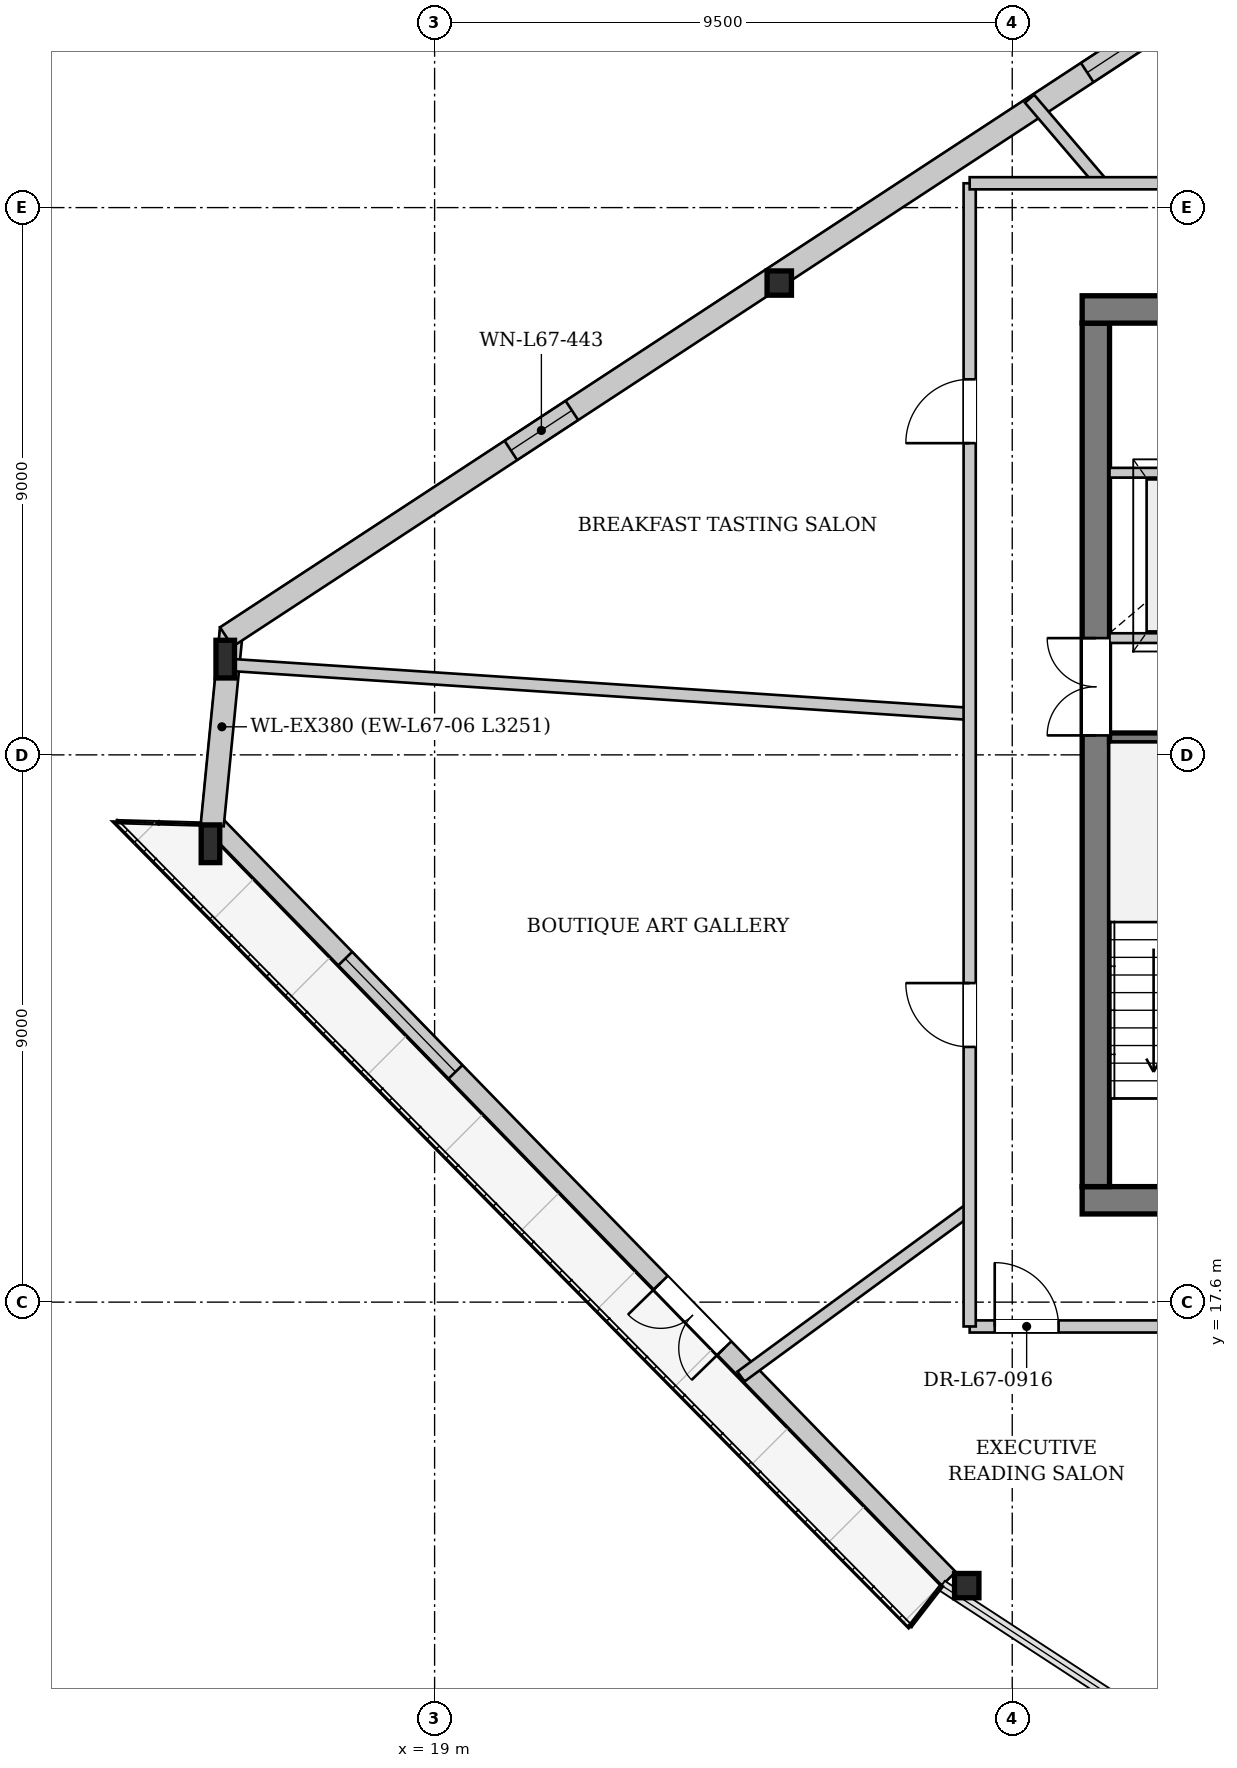
"""IFC4 building model, lengths in metres.
Left out: names, types, materials, properties, quantities, classifications, styles, units other than length and angle.
Written with IfcOpenShell. Run it as: python <this file> out.ifc"""

import sys

from ifc_helpers import new_model, si_unit, direction, frame, frame_2d, origin, origin_2d, place, context, subcontext, project, spatial, rectangle, i_section, extrude, source, transform, mapped, element, fill, save


model = new_model("IFC4")
c1 = context("Model", 3, precision=1e-05, world=origin(), true_north=direction((0.0, 1.0)))
c2 = subcontext(c1, "Body", "Model", "MODEL_VIEW")
j1 = project(units=[si_unit("LENGTHUNIT", "METRE"), si_unit("PLANEANGLEUNIT", "RADIAN")], contexts=[c1])
p1 = place(None, origin())
s1 = spatial("IfcSite", under=j1, at=p1, CompositionType="ELEMENT")
p2 = place(p1, origin())
s2 = spatial("IfcBuilding", under=s1, at=p2, CompositionType="ELEMENT")
p3 = place(p2, frame((0.0, 0.0, 252.5)))
s3 = spatial("IfcBuildingStorey", under=s2, at=p3, CompositionType="ELEMENT", Elevation=252.5)
m1 = source(origin(), c2, "Body", "SweptSolid", [
    extrude(i_section(OverallWidth=0.401, OverallDepth=0.399, WebThickness=0.022, FlangeThickness=0.034, at=origin_2d()), origin(), (0.0, 0.0, 1.0), 3.53),
])
p4 = place(p3, frame((24.722, 34.763, 0.0), z_axis=(-0.030704903352, -0.228696205821, 0.973013491352), x_axis=(0.991107085952, -0.133066690705, 0.0)))
e1 = element("IfcColumn", 1, at=p4, inside=s3, PredefinedType="COLUMN", context=c2, shape_type="MappedRepresentation", body=[
    mapped(m1, transform((0.0, 0.0, 0.0), x_axis=(1.0, 0.0, 0.0), y_axis=(0.0, 1.0, 0.0), z_axis=(0.0, 0.0, 1.0), scale=1.0)),
])
m2 = source(origin(), c2, "Body", "SweptSolid", [
    extrude(i_section(OverallWidth=0.305, OverallDepth=0.62, WebThickness=0.021, FlangeThickness=0.04, at=origin_2d()), origin(), (0.0, 0.0, 1.0), 3.595),
])
p5 = place(p3, frame((15.471, 28.698, 0.0), z_axis=(0.047604177854, -0.291193601478, 0.95547900485), x_axis=(0.986899246585, 0.161337773287, 0.0)))
e2 = element("IfcColumn", 2, at=p5, inside=s3, PredefinedType="COLUMN", context=c2, shape_type="MappedRepresentation", body=[
    mapped(m2, transform((0.0, 0.0, 0.0), x_axis=(1.0, 0.0, 0.0), y_axis=(0.0, 1.0, 0.0), z_axis=(0.0, 0.0, 1.0), scale=1.0)),
])
m3 = source(origin(), c2, "Body", "SweptSolid", [
    extrude(i_section(OverallWidth=0.305, OverallDepth=0.62, WebThickness=0.021, FlangeThickness=0.04, at=origin_2d()), origin(), (0.0, 0.0, 1.0), 3.51),
])
p6 = place(p3, frame((15.154, 25.462, 0.0), z_axis=(0.091177357458, -0.184788893033, 0.978539602928), x_axis=(0.896777314294, 0.442482144915, 0.0)))
e3 = element("IfcColumn", 3, at=p6, inside=s3, PredefinedType="COLUMN", context=c2, shape_type="MappedRepresentation", body=[
    mapped(m3, transform((0.0, 0.0, 0.0), x_axis=(1.0, 0.0, 0.0), y_axis=(0.0, 1.0, 0.0), z_axis=(0.0, 0.0, 1.0), scale=1.0)),
])
m4 = source(origin(), c2, "Body", "SweptSolid", [
    extrude(i_section(OverallWidth=0.401, OverallDepth=0.399, WebThickness=0.022, FlangeThickness=0.034, at=origin_2d()), origin(), (0.0, 0.0, 1.0), 3.532),
])
p7 = place(p3, frame((27.341, 12.94, 0.0), z_axis=(0.232405350285, -0.001036906679, 0.972618464756), x_axis=(0.004461585576, 0.999990047078, 0.0)))
e4 = element("IfcColumn", 4, at=p7, inside=s3, PredefinedType="COLUMN", context=c2, shape_type="MappedRepresentation", body=[
    mapped(m4, transform((0.0, 0.0, 0.0), x_axis=(1.0, 0.0, 0.0), y_axis=(0.0, 1.0, 0.0), z_axis=(0.0, 0.0, 1.0), scale=1.0)),
])
p8 = place(p3, frame((27.456, 13.052, 0.0), z_axis=(0.0, 0.0, 1.0), x_axis=(-0.697464355139, 0.71661947595, 0.0)))
e5 = element("IfcWall", 5, at=p8, inside=s3, PredefinedType="SOLIDWALL", context=c2, shape_type="SweptSolid", body=[
    extrude(rectangle(XDim=17.474, YDim=0.32, at=frame_2d((8.737, 0.0))), origin(), (0.0, 0.0, 1.0), 2.872),
])
p9 = place(p8, frame((5.292, 0.0, 0.0)))
e6 = element("IfcOpeningElement", 6, at=p9, cuts=e5, PredefinedType="OPENING", context=c2, shape_type="SweptSolid", body=[
    extrude(rectangle(XDim=1.5, YDim=2.3, at=frame_2d((0.75, 1.15))), frame((0.0, 0.17, 0.0), z_axis=(0.0, -1.0, 0.0), x_axis=(1.0, 0.0, 0.0)), (0.0, 0.0, 1.0), 0.34),
])
p10 = place(p8, frame((11.631, 0.0, 0.402)))
e7 = element("IfcOpeningElement", 7, at=p10, cuts=e5, PredefinedType="OPENING", context=c2, shape_type="SweptSolid", body=[
    extrude(rectangle(XDim=2.6, YDim=2.35, at=frame_2d((1.3, 1.175))), frame((0.0, 0.17, 0.0), z_axis=(0.0, -1.0, 0.0), x_axis=(1.0, 0.0, 0.0)), (0.0, 0.0, 1.0), 0.34),
])
p11 = place(p3, frame((15.343, 25.444, 0.0), z_axis=(0.0, 0.0, 1.0), x_axis=(0.097555380109, 0.995230097923, 0.0)))
e8 = element("IfcWall", 8, at=p11, inside=s3, PredefinedType="SOLIDWALL", context=c2, shape_type="SweptSolid", body=[
    extrude(rectangle(XDim=3.251, YDim=0.38, at=frame_2d((1.625, 0.0))), origin(), (0.0, 0.0, 1.0), 2.872),
])
p12 = place(p3, frame((15.575, 28.539, 0.0), z_axis=(0.0, 0.0, 1.0), x_axis=(0.836303758155, 0.5482663806, 0.0)))
e9 = element("IfcWall", 9, at=p12, inside=s3, PredefinedType="SOLIDWALL", context=c2, shape_type="SweptSolid", body=[
    extrude(rectangle(XDim=22.124, YDim=0.38, at=frame_2d((11.062, 0.0))), origin(), (0.0, 0.0, 1.0), 2.872),
])
p13 = place(p12, frame((5.595, 0.0, 0.65)))
e10 = element("IfcOpeningElement", 10, at=p13, cuts=e9, PredefinedType="OPENING", context=c2, shape_type="SweptSolid", body=[
    extrude(rectangle(XDim=1.2, YDim=1.5, at=frame_2d((0.6, 0.75))), frame((0.0, 0.2, 0.0), z_axis=(0.0, -1.0, 0.0), x_axis=(1.0, 0.0, 0.0)), (0.0, 0.0, 1.0), 0.4),
])
p14 = place(p12, frame((16.929, 0.0, 0.65)))
e11 = element("IfcOpeningElement", 11, at=p14, cuts=e9, PredefinedType="OPENING", context=c2, shape_type="SweptSolid", body=[
    extrude(rectangle(XDim=1.2, YDim=1.5, at=frame_2d((0.6, 0.75))), frame((0.0, 0.2, 0.0), z_axis=(0.0, -1.0, 0.0), x_axis=(1.0, 0.0, 0.0)), (0.0, 0.0, 1.0), 0.4),
])
p15 = place(p3, frame((46.35, 19.275, 0.0), z_axis=(0.0, 0.0, 1.0), x_axis=(-1.0, 0.0, 0.0)))
e12 = element("IfcWall", 12, at=p15, inside=s3, PredefinedType="SHEAR", context=c2, shape_type="SweptSolid", body=[
    extrude(rectangle(XDim=16.7, YDim=0.45, at=frame_2d((8.35, 0.0))), origin(), (0.0, 0.0, 1.0), 3.38),
])
p16 = place(p15, frame((4.55, 0.0, 0.0)))
e13 = element("IfcOpeningElement", 13, at=p16, cuts=e12, PredefinedType="OPENING", context=c2, shape_type="SweptSolid", body=[
    extrude(rectangle(XDim=1.12, YDim=2.25, at=frame_2d((0.56, 1.125))), frame((0.0, 0.235, 0.0), z_axis=(0.0, -1.0, 0.0), x_axis=(1.0, 0.0, 0.0)), (0.0, 0.0, 1.0), 0.47),
])
p17 = place(p15, frame((11.05, 0.0, 0.0)))
e14 = element("IfcOpeningElement", 14, at=p17, cuts=e12, PredefinedType="OPENING", context=c2, shape_type="SweptSolid", body=[
    extrude(rectangle(XDim=1.12, YDim=2.25, at=frame_2d((0.56, 1.125))), frame((0.0, 0.235, 0.0), z_axis=(0.0, -1.0, 0.0), x_axis=(1.0, 0.0, 0.0)), (0.0, 0.0, 1.0), 0.47),
])
p18 = place(p3, frame((29.875, 19.5, 0.0), z_axis=(0.0, 0.0, 1.0), x_axis=(0.0, 1.0, 0.0)))
e15 = element("IfcWall", 15, at=p18, inside=s3, PredefinedType="SHEAR", context=c2, shape_type="SweptSolid", body=[
    extrude(rectangle(XDim=14.2, YDim=0.45, at=frame_2d((7.1, 0.0))), origin(), (0.0, 0.0, 1.0), 3.38),
])
p19 = place(p18, frame((7.42, 0.0, 0.0)))
e16 = element("IfcOpeningElement", 16, at=p19, cuts=e15, PredefinedType="OPENING", context=c2, shape_type="SweptSolid", body=[
    extrude(rectangle(XDim=1.6, YDim=2.2, at=frame_2d((0.8, 1.1))), frame((0.0, 0.235, 0.0), z_axis=(0.0, -1.0, 0.0), x_axis=(1.0, 0.0, 0.0)), (0.0, 0.0, 1.0), 0.47),
])
p20 = place(p3, frame((29.65, 33.925, 0.0), z_axis=(0.0, 0.0, 1.0), x_axis=(1.0, 0.0, 0.0)))
e17 = element("IfcWall", 17, at=p20, inside=s3, PredefinedType="SHEAR", context=c2, shape_type="SweptSolid", body=[
    extrude(rectangle(XDim=16.7, YDim=0.45, at=frame_2d((8.35, 0.0))), origin(), (0.0, 0.0, 1.0), 3.38),
])
p21 = place(p20, frame((1.45, 0.0, 0.0)))
e18 = element("IfcOpeningElement", 18, at=p21, cuts=e17, PredefinedType="OPENING", context=c2, shape_type="SweptSolid", body=[
    extrude(rectangle(XDim=0.95, YDim=2.1, at=frame_2d((0.475, 1.05))), frame((0.0, 0.235, 0.0), z_axis=(0.0, -1.0, 0.0), x_axis=(1.0, 0.0, 0.0)), (0.0, 0.0, 1.0), 0.47),
])
p22 = place(p20, frame((3.83, 0.0, 0.0)))
e19 = element("IfcOpeningElement", 19, at=p22, cuts=e17, PredefinedType="OPENING", context=c2, shape_type="SweptSolid", body=[
    extrude(rectangle(XDim=1.32, YDim=2.2, at=frame_2d((0.66, 1.1))), frame((0.0, 0.235, 0.0), z_axis=(0.0, -1.0, 0.0), x_axis=(1.0, 0.0, 0.0)), (0.0, 0.0, 1.0), 0.47),
])
for number, where, z_axis, x_axis in (
    (20, (30.1, 26.88, 0.0), (0.0, 0.0, 1.0), (1.0, 0.0, 0.0)),
    (21, (30.1, 28.52, 0.0), (0.0, 0.0, 1.0), (1.0, 0.0, 0.0)),
):
    element("IfcWall", number, at=place(p3, frame(where, z_axis=z_axis, x_axis=x_axis)), inside=s3, PredefinedType="PARTITIONING", context=c2, shape_type="SweptSolid", body=[
        extrude(rectangle(XDim=3.02, YDim=0.16, at=frame_2d((1.51, 0.0))), origin(), (0.0, 0.0, 1.0), 3.38),
    ])
p23 = place(p3, frame((30.1, 31.24, 0.0), z_axis=(0.0, 0.0, 1.0), x_axis=(1.0, 0.0, 0.0)))
e22 = element("IfcWall", 22, at=p23, inside=s3, PredefinedType="PARTITIONING", context=c2, shape_type="SweptSolid", body=[
    extrude(rectangle(XDim=3.02, YDim=0.16, at=frame_2d((1.51, 0.0))), origin(), (0.0, 0.0, 1.0), 3.38),
])
p24 = place(p23, frame((0.91, 0.0, 0.0)))
e23 = element("IfcOpeningElement", 23, at=p24, cuts=e22, PredefinedType="OPENING", context=c2, shape_type="SweptSolid", body=[
    extrude(rectangle(XDim=1.2, YDim=2.2, at=frame_2d((0.6, 1.1))), frame((0.0, 0.09, 0.0), z_axis=(0.0, -1.0, 0.0), x_axis=(1.0, 0.0, 0.0)), (0.0, 0.0, 1.0), 0.18),
])
p25 = place(p3, frame((29.972, 36.0, 0.0), z_axis=(0.0, 0.0, 1.0), x_axis=(-0.649426318999, 0.760424523665, 0.0)))
e24 = element("IfcWall", 24, at=p25, inside=s3, PredefinedType="PARTITIONING", context=c2, shape_type="SweptSolid", body=[
    extrude(rectangle(XDim=1.828, YDim=0.2, at=frame_2d((0.914, 0.0))), origin(), (0.0, 0.0, 1.0), 3.38),
])
p26 = place(p3, frame((27.8, 27.275, 0.0), z_axis=(0.0, 0.0, 1.0), x_axis=(-0.997817226198, 0.066036225681, 0.0)))
e25 = element("IfcWall", 25, at=p26, inside=s3, PredefinedType="PARTITIONING", context=c2, shape_type="SweptSolid", body=[
    extrude(rectangle(XDim=12.385, YDim=0.2, at=frame_2d((6.193, 0.0))), origin(), (0.0, 0.0, 1.0), 3.055),
])
p27 = place(p3, frame((27.8, 19.131, 0.0), z_axis=(0.0, 0.0, 1.0), x_axis=(-0.80679773716, -0.590827734042, 0.0)))
e26 = element("IfcWall", 26, at=p27, inside=s3, PredefinedType="PARTITIONING", context=c2, shape_type="SweptSolid", body=[
    extrude(rectangle(XDim=4.662, YDim=0.2, at=frame_2d((2.331, 0.0))), origin(), (0.0, 0.0, 1.0), 3.38),
])
p28 = place(p3, frame((27.8, 17.2, 0.0), z_axis=(0.0, 0.0, 1.0), x_axis=(1.0, 0.0, 0.0)))
e27 = element("IfcWall", 27, at=p28, inside=s3, PredefinedType="PARTITIONING", context=c2, shape_type="SweptSolid", body=[
    extrude(rectangle(XDim=20.4, YDim=0.2, at=frame_2d((10.2, 0.0))), origin(), (0.0, 0.0, 1.0), 3.38),
])
p29 = place(p28, frame((9.356, 0.0, 0.0)))
e28 = element("IfcOpeningElement", 28, at=p29, cuts=e27, PredefinedType="OPENING", context=c2, shape_type="SweptSolid", body=[
    extrude(rectangle(XDim=1.05, YDim=2.2, at=frame_2d((0.525, 1.1))), frame((0.0, 0.11, 0.0), z_axis=(0.0, -1.0, 0.0), x_axis=(1.0, 0.0, 0.0)), (0.0, 0.0, 1.0), 0.22),
])
p30 = place(p28, frame((17.51, 0.0, 0.0)))
e29 = element("IfcOpeningElement", 29, at=p30, cuts=e27, PredefinedType="OPENING", context=c2, shape_type="SweptSolid", body=[
    extrude(rectangle(XDim=1.05, YDim=2.2, at=frame_2d((0.525, 1.1))), frame((0.0, 0.11, 0.0), z_axis=(0.0, -1.0, 0.0), x_axis=(1.0, 0.0, 0.0)), (0.0, 0.0, 1.0), 0.22),
])
p31 = place(p28, frame((0.412, 0.0, 0.0)))
e30 = element("IfcOpeningElement", 30, at=p31, cuts=e27, PredefinedType="OPENING", context=c2, shape_type="SweptSolid", body=[
    extrude(rectangle(XDim=1.05, YDim=2.2, at=frame_2d((0.525, 1.1))), frame((0.0, 0.11, 0.0), z_axis=(0.0, -1.0, 0.0), x_axis=(1.0, 0.0, 0.0)), (0.0, 0.0, 1.0), 0.22),
])
p32 = place(p3, frame((27.8, 17.2, 0.0), z_axis=(0.0, 0.0, 1.0), x_axis=(0.0, 1.0, 0.0)))
e31 = element("IfcWall", 31, at=p32, inside=s3, PredefinedType="PARTITIONING", context=c2, shape_type="SweptSolid", body=[
    extrude(rectangle(XDim=18.8, YDim=0.2, at=frame_2d((9.4, 0.0))), origin(), (0.0, 0.0, 1.0), 3.38),
])
p33 = place(p32, frame((14.526, 0.0, 0.0)))
e32 = element("IfcOpeningElement", 32, at=p33, cuts=e31, PredefinedType="OPENING", context=c2, shape_type="SweptSolid", body=[
    extrude(rectangle(XDim=1.05, YDim=2.2, at=frame_2d((0.525, 1.1))), frame((0.0, 0.11, 0.0), z_axis=(0.0, -1.0, 0.0), x_axis=(1.0, 0.0, 0.0)), (0.0, 0.0, 1.0), 0.22),
])
p34 = place(p32, frame((4.597, 0.0, 0.0)))
e33 = element("IfcOpeningElement", 33, at=p34, cuts=e31, PredefinedType="OPENING", context=c2, shape_type="SweptSolid", body=[
    extrude(rectangle(XDim=1.05, YDim=2.2, at=frame_2d((0.525, 1.1))), frame((0.0, 0.11, 0.0), z_axis=(0.0, -1.0, 0.0), x_axis=(1.0, 0.0, 0.0)), (0.0, 0.0, 1.0), 0.22),
])
p35 = place(p3, frame((27.8, 36.0, 0.0), z_axis=(0.0, 0.0, 1.0), x_axis=(1.0, 0.0, 0.0)))
e34 = element("IfcWall", 34, at=p35, inside=s3, PredefinedType="PARTITIONING", context=c2, shape_type="SweptSolid", body=[
    extrude(rectangle(XDim=13.2, YDim=0.2, at=frame_2d((6.6, 0.0))), origin(), (0.0, 0.0, 1.0), 3.38),
])
p36 = place(p35, frame((11.129, 0.0, 0.0)))
e35 = element("IfcOpeningElement", 35, at=p36, cuts=e34, PredefinedType="OPENING", context=c2, shape_type="SweptSolid", body=[
    extrude(rectangle(XDim=1.05, YDim=2.2, at=frame_2d((0.525, 1.1))), frame((0.0, 0.11, 0.0), z_axis=(0.0, -1.0, 0.0), x_axis=(1.0, 0.0, 0.0)), (0.0, 0.0, 1.0), 0.22),
])
p37 = place(p35, frame((3.396, 0.0, 0.0)))
e36 = element("IfcOpeningElement", 36, at=p37, cuts=e34, PredefinedType="OPENING", context=c2, shape_type="SweptSolid", body=[
    extrude(rectangle(XDim=1.05, YDim=2.2, at=frame_2d((0.525, 1.1))), frame((0.0, 0.11, 0.0), z_axis=(0.0, -1.0, 0.0), x_axis=(1.0, 0.0, 0.0)), (0.0, 0.0, 1.0), 0.22),
])
m5 = source(origin(), c2, "Body", "SweptSolid", [
    extrude(rectangle(XDim=1.5, YDim=2.3, at=frame_2d((0.75, 1.15))), frame((0.0, 0.025, 0.0), z_axis=(0.0, -1.0, 0.0), x_axis=(1.0, 0.0, 0.0)), (0.0, 0.0, 1.0), 0.05),
])
p38 = place(p9, origin())
e37 = element("IfcDoor", 37, at=p38, inside=s3, OperationType="DOUBLE_DOOR_SINGLE_SWING", PredefinedType="DOOR", context=c2, shape_type="MappedRepresentation", body=[
    mapped(m5, transform((0.0, 0.0, 0.0), x_axis=(1.0, 0.0, 0.0), y_axis=(0.0, 1.0, 0.0), z_axis=(0.0, 0.0, 1.0), scale=1.0)),
])
fill(e6, e37)
m6 = source(origin(), c2, "Body", "SweptSolid", [
    extrude(rectangle(XDim=2.6, YDim=2.35, at=frame_2d((1.3, 1.175))), frame((0.0, 0.03, 0.0), z_axis=(0.0, -1.0, 0.0), x_axis=(1.0, 0.0, 0.0)), (0.0, 0.0, 1.0), 0.06),
])
p39 = place(p10, origin())
e38 = element("IfcWindow", 38, at=p39, inside=s3, PartitioningType="SINGLE_PANEL", PredefinedType="WINDOW", context=c2, shape_type="MappedRepresentation", body=[
    mapped(m6, transform((0.0, 0.0, 0.0), x_axis=(1.0, 0.0, 0.0), y_axis=(0.0, 1.0, 0.0), z_axis=(0.0, 0.0, 1.0), scale=1.0)),
])
fill(e7, e38)
m7 = source(origin(), c2, "Body", "SweptSolid", [
    extrude(rectangle(XDim=1.2, YDim=1.5, at=frame_2d((0.6, 0.75))), frame((0.0, 0.03, 0.0), z_axis=(0.0, -1.0, 0.0), x_axis=(1.0, 0.0, 0.0)), (0.0, 0.0, 1.0), 0.06),
])
p40 = place(p13, origin())
e39 = element("IfcWindow", 39, at=p40, inside=s3, PartitioningType="SINGLE_PANEL", PredefinedType="WINDOW", context=c2, shape_type="MappedRepresentation", body=[
    mapped(m7, transform((0.0, 0.0, 0.0), x_axis=(1.0, 0.0, 0.0), y_axis=(0.0, 1.0, 0.0), z_axis=(0.0, 0.0, 1.0), scale=1.0)),
])
fill(e10, e39)
p41 = place(p14, origin())
e40 = element("IfcWindow", 40, at=p41, inside=s3, PartitioningType="SINGLE_PANEL", PredefinedType="WINDOW", context=c2, shape_type="MappedRepresentation", body=[
    mapped(m7, transform((0.0, 0.0, 0.0), x_axis=(1.0, 0.0, 0.0), y_axis=(0.0, 1.0, 0.0), z_axis=(0.0, 0.0, 1.0), scale=1.0)),
])
fill(e11, e40)
m8 = source(origin(), c2, "Body", "SweptSolid", [
    extrude(rectangle(XDim=1.6, YDim=2.2, at=frame_2d((0.8, 1.1))), frame((0.0, 0.025, 0.0), z_axis=(0.0, -1.0, 0.0), x_axis=(1.0, 0.0, 0.0)), (0.0, 0.0, 1.0), 0.05),
])
p42 = place(p19, origin())
e41 = element("IfcDoor", 41, at=p42, inside=s3, OperationType="DOUBLE_DOOR_SINGLE_SWING", PredefinedType="DOOR", context=c2, shape_type="MappedRepresentation", body=[
    mapped(m8, transform((0.0, 0.0, 0.0), x_axis=(1.0, 0.0, 0.0), y_axis=(0.0, 1.0, 0.0), z_axis=(0.0, 0.0, 1.0), scale=1.0)),
])
fill(e16, e41)
m9 = source(origin(), c2, "Body", "SweptSolid", [
    extrude(rectangle(XDim=1.05, YDim=2.2, at=frame_2d((0.525, 1.1))), frame((0.0, 0.025, 0.0), z_axis=(0.0, -1.0, 0.0), x_axis=(1.0, 0.0, 0.0)), (0.0, 0.0, 1.0), 0.05),
])
p43 = place(p31, origin())
e42 = element("IfcDoor", 42, at=p43, inside=s3, OperationType="SINGLE_SWING_LEFT", PredefinedType="DOOR", context=c2, shape_type="MappedRepresentation", body=[
    mapped(m9, transform((0.0, 0.0, 0.0), x_axis=(1.0, 0.0, 0.0), y_axis=(0.0, 1.0, 0.0), z_axis=(0.0, 0.0, 1.0), scale=1.0)),
])
fill(e30, e42)
p44 = place(p33, origin())
e43 = element("IfcDoor", 43, at=p44, inside=s3, OperationType="SINGLE_SWING_LEFT", PredefinedType="DOOR", context=c2, shape_type="MappedRepresentation", body=[
    mapped(m9, transform((0.0, 0.0, 0.0), x_axis=(1.0, 0.0, 0.0), y_axis=(0.0, 1.0, 0.0), z_axis=(0.0, 0.0, 1.0), scale=1.0)),
])
fill(e32, e43)
p45 = place(p34, origin())
e44 = element("IfcDoor", 44, at=p45, inside=s3, OperationType="SINGLE_SWING_RIGHT", PredefinedType="DOOR", context=c2, shape_type="MappedRepresentation", body=[
    mapped(m9, transform((0.0, 0.0, 0.0), x_axis=(1.0, 0.0, 0.0), y_axis=(0.0, 1.0, 0.0), z_axis=(0.0, 0.0, 1.0), scale=1.0)),
])
fill(e33, e44)
save(model, sys.argv[1])
